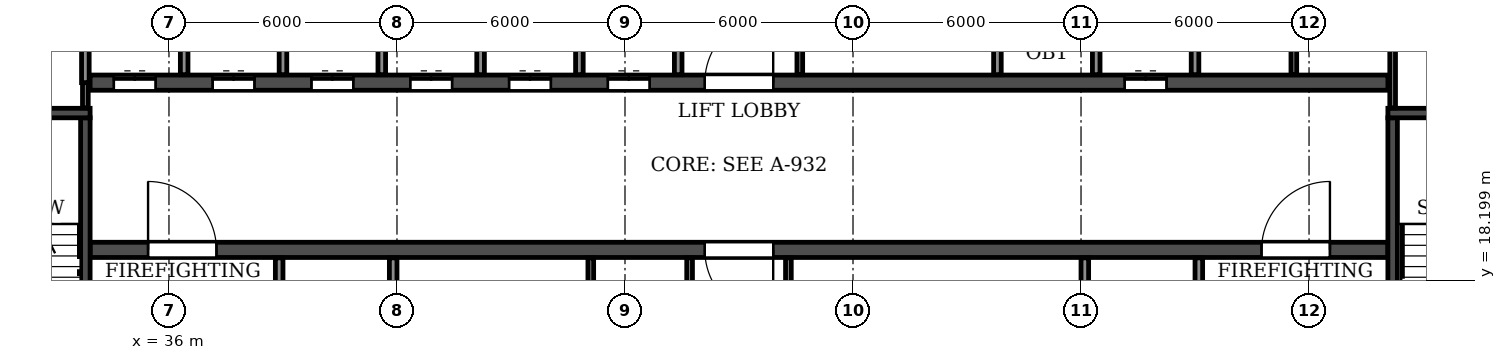
"""IFC4 building model, lengths in metres.
Left out: names, types, materials, properties, quantities, classifications, styles, units other than length and angle.
Written with IfcOpenShell. Run it as: python <this file> out.ifc"""

import sys

from ifc_helpers import new_model, si_unit, direction, frame, frame_2d, origin, place, context, subcontext, project, spatial, rectangle, extrude, element, fill, save


model = new_model("IFC4")
c1 = context("Model", 3, precision=1e-05, world=origin(), true_north=direction((0.0, 1.0)))
c2 = subcontext(c1, "Body", "Model", "MODEL_VIEW")
j1 = project(units=[si_unit("LENGTHUNIT", "METRE"), si_unit("PLANEANGLEUNIT", "RADIAN")], contexts=[c1])
p1 = place(None, origin())
s1 = spatial("IfcSite", under=j1, at=p1, CompositionType="ELEMENT")
p2 = place(p1, origin())
s2 = spatial("IfcBuilding", under=s1, at=p2, CompositionType="ELEMENT")
p3 = place(p2, frame((0.0, 0.0, 175.2)))
s3 = spatial("IfcBuildingStorey", under=s2, at=p3, CompositionType="ELEMENT", Elevation=175.2)
p4 = place(p3, frame((33.925, 19.0, 0.0), z_axis=(0.0, 0.0, 1.0), x_axis=(1.0, 0.0, 0.0)))
e1 = element("IfcWall", 1, at=p4, inside=s3, PredefinedType="SOLIDWALL", context=c2, shape_type="SweptSolid", body=[
    extrude(rectangle(XDim=34.15, YDim=0.4, at=frame_2d((17.075, 0.0))), origin(), (0.0, 0.0, 1.0), 3.08),
])
p5 = place(p4, frame((16.175, 0.0, 0.0)))
e2 = element("IfcOpeningElement", 2, at=p5, cuts=e1, PredefinedType="OPENING", context=c2, shape_type="SweptSolid", body=[
    extrude(rectangle(XDim=1.8, YDim=2.1, at=frame_2d((0.9, 1.05))), frame((0.0, 0.21, 0.0), z_axis=(0.0, -1.0, 0.0), x_axis=(1.0, 0.0, 0.0)), (0.0, 0.0, 1.0), 0.42),
])
p6 = place(p4, frame((1.525, 0.0, 0.0)))
e3 = element("IfcOpeningElement", 3, at=p6, cuts=e1, PredefinedType="OPENING", context=c2, shape_type="SweptSolid", body=[
    extrude(rectangle(XDim=1.8, YDim=2.1, at=frame_2d((0.9, 1.05))), frame((0.0, 0.21, 0.0), z_axis=(0.0, -1.0, 0.0), x_axis=(1.0, 0.0, 0.0)), (0.0, 0.0, 1.0), 0.42),
])
p7 = place(p4, frame((30.825, 0.0, 0.0)))
e4 = element("IfcOpeningElement", 4, at=p7, cuts=e1, PredefinedType="OPENING", context=c2, shape_type="SweptSolid", body=[
    extrude(rectangle(XDim=1.8, YDim=2.1, at=frame_2d((0.9, 1.05))), frame((0.0, 0.21, 0.0), z_axis=(0.0, -1.0, 0.0), x_axis=(1.0, 0.0, 0.0)), (0.0, 0.0, 1.0), 0.42),
])
p8 = place(p3, frame((33.925, 23.4, 0.0), z_axis=(0.0, 0.0, 1.0), x_axis=(1.0, 0.0, 0.0)))
e5 = element("IfcWall", 5, at=p8, inside=s3, PredefinedType="SOLIDWALL", context=c2, shape_type="SweptSolid", body=[
    extrude(rectangle(XDim=34.15, YDim=0.4, at=frame_2d((17.075, 0.0))), origin(), (0.0, 0.0, 1.0), 3.08),
])
p9 = place(p8, frame((16.175, 0.0, 0.0)))
e6 = element("IfcOpeningElement", 6, at=p9, cuts=e5, PredefinedType="OPENING", context=c2, shape_type="SweptSolid", body=[
    extrude(rectangle(XDim=1.8, YDim=2.1, at=frame_2d((0.9, 1.05))), frame((0.0, 0.21, 0.0), z_axis=(0.0, -1.0, 0.0), x_axis=(1.0, 0.0, 0.0)), (0.0, 0.0, 1.0), 0.42),
])
p10 = place(p8, frame((0.625, 0.0, 0.0)))
e7 = element("IfcOpeningElement", 7, at=p10, cuts=e5, PredefinedType="OPENING", context=c2, shape_type="SweptSolid", body=[
    extrude(rectangle(XDim=1.1, YDim=2.1, at=frame_2d((0.55, 1.05))), frame((0.0, 0.21, 0.0), z_axis=(0.0, -1.0, 0.0), x_axis=(1.0, 0.0, 0.0)), (0.0, 0.0, 1.0), 0.42),
])
p11 = place(p8, frame((3.225, 0.0, 0.0)))
e8 = element("IfcOpeningElement", 8, at=p11, cuts=e5, PredefinedType="OPENING", context=c2, shape_type="SweptSolid", body=[
    extrude(rectangle(XDim=1.1, YDim=2.1, at=frame_2d((0.55, 1.05))), frame((0.0, 0.21, 0.0), z_axis=(0.0, -1.0, 0.0), x_axis=(1.0, 0.0, 0.0)), (0.0, 0.0, 1.0), 0.42),
])
p12 = place(p8, frame((5.825, 0.0, 0.0)))
e9 = element("IfcOpeningElement", 9, at=p12, cuts=e5, PredefinedType="OPENING", context=c2, shape_type="SweptSolid", body=[
    extrude(rectangle(XDim=1.1, YDim=2.1, at=frame_2d((0.55, 1.05))), frame((0.0, 0.21, 0.0), z_axis=(0.0, -1.0, 0.0), x_axis=(1.0, 0.0, 0.0)), (0.0, 0.0, 1.0), 0.42),
])
p13 = place(p8, frame((8.425, 0.0, 0.0)))
e10 = element("IfcOpeningElement", 10, at=p13, cuts=e5, PredefinedType="OPENING", context=c2, shape_type="SweptSolid", body=[
    extrude(rectangle(XDim=1.1, YDim=2.1, at=frame_2d((0.55, 1.05))), frame((0.0, 0.21, 0.0), z_axis=(0.0, -1.0, 0.0), x_axis=(1.0, 0.0, 0.0)), (0.0, 0.0, 1.0), 0.42),
])
p14 = place(p8, frame((11.025, 0.0, 0.0)))
e11 = element("IfcOpeningElement", 11, at=p14, cuts=e5, PredefinedType="OPENING", context=c2, shape_type="SweptSolid", body=[
    extrude(rectangle(XDim=1.1, YDim=2.1, at=frame_2d((0.55, 1.05))), frame((0.0, 0.21, 0.0), z_axis=(0.0, -1.0, 0.0), x_axis=(1.0, 0.0, 0.0)), (0.0, 0.0, 1.0), 0.42),
])
p15 = place(p8, frame((13.625, 0.0, 0.0)))
e12 = element("IfcOpeningElement", 12, at=p15, cuts=e5, PredefinedType="OPENING", context=c2, shape_type="SweptSolid", body=[
    extrude(rectangle(XDim=1.1, YDim=2.1, at=frame_2d((0.55, 1.05))), frame((0.0, 0.21, 0.0), z_axis=(0.0, -1.0, 0.0), x_axis=(1.0, 0.0, 0.0)), (0.0, 0.0, 1.0), 0.42),
])
p16 = place(p8, frame((27.225, 0.0, 0.0)))
e13 = element("IfcOpeningElement", 13, at=p16, cuts=e5, PredefinedType="OPENING", context=c2, shape_type="SweptSolid", body=[
    extrude(rectangle(XDim=1.1, YDim=2.1, at=frame_2d((0.55, 1.05))), frame((0.0, 0.21, 0.0), z_axis=(0.0, -1.0, 0.0), x_axis=(1.0, 0.0, 0.0)), (0.0, 0.0, 1.0), 0.42),
])
p17 = place(p3, frame((33.8, 14.8, 0.0), z_axis=(0.0, 0.0, 1.0), x_axis=(0.0, 1.0, 0.0)))
e14 = element("IfcWall", 14, at=p17, inside=s3, PredefinedType="SOLIDWALL", context=c2, shape_type="SweptSolid", body=[
    extrude(rectangle(XDim=7.675, YDim=0.25, at=frame_2d((3.837, 0.0))), origin(), (0.0, 0.0, 1.0), 3.08),
])
p18 = place(p17, frame((0.5, 0.0, 0.0)))
e15 = element("IfcOpeningElement", 15, at=p18, cuts=e14, PredefinedType="OPENING", context=c2, shape_type="SweptSolid", body=[
    extrude(rectangle(XDim=1.0, YDim=2.1, at=frame_2d((0.5, 1.05))), frame((0.0, 0.135, 0.0), z_axis=(0.0, -1.0, 0.0), x_axis=(1.0, 0.0, 0.0)), (0.0, 0.0, 1.0), 0.27),
])
p19 = place(p3, frame((29.875, 22.6, 0.0), z_axis=(0.0, 0.0, 1.0), x_axis=(1.0, 0.0, 0.0)))
e16 = element("IfcWall", 16, at=p19, inside=s3, PredefinedType="SOLIDWALL", context=c2, shape_type="SweptSolid", body=[
    extrude(rectangle(XDim=4.05, YDim=0.25, at=frame_2d((2.025, 0.0))), origin(), (0.0, 0.0, 1.0), 3.08),
])
p20 = place(p3, frame((68.2, 14.8, 0.0), z_axis=(0.0, 0.0, 1.0), x_axis=(0.0, 1.0, 0.0)))
e17 = element("IfcWall", 17, at=p20, inside=s3, PredefinedType="SOLIDWALL", context=c2, shape_type="SweptSolid", body=[
    extrude(rectangle(XDim=7.675, YDim=0.25, at=frame_2d((3.837, 0.0))), origin(), (0.0, 0.0, 1.0), 3.08),
])
p21 = place(p20, frame((0.5, 0.0, 0.0)))
e18 = element("IfcOpeningElement", 18, at=p21, cuts=e17, PredefinedType="OPENING", context=c2, shape_type="SweptSolid", body=[
    extrude(rectangle(XDim=1.0, YDim=2.1, at=frame_2d((0.5, 1.05))), frame((0.0, 0.135, 0.0), z_axis=(0.0, -1.0, 0.0), x_axis=(1.0, 0.0, 0.0)), (0.0, 0.0, 1.0), 0.27),
])
p22 = place(p3, frame((68.075, 22.6, 0.0), z_axis=(0.0, 0.0, 1.0), x_axis=(1.0, 0.0, 0.0)))
e19 = element("IfcWall", 19, at=p22, inside=s3, PredefinedType="SOLIDWALL", context=c2, shape_type="SweptSolid", body=[
    extrude(rectangle(XDim=4.05, YDim=0.25, at=frame_2d((2.025, 0.0))), origin(), (0.0, 0.0, 1.0), 3.08),
])
for number, where, z_axis, x_axis in (
    (20, (49.7, 14.81, 0.0), (0.0, 0.0, 1.0), (0.0, 1.0, 0.0)),
    (21, (52.3, 14.81, 0.0), (0.0, 0.0, 1.0), (0.0, 1.0, 0.0)),
    (22, (52.6, 23.61, 0.0), (0.0, 0.0, 1.0), (0.0, 1.0, 0.0)),
    (23, (47.1, 14.81, 0.0), (0.0, 0.0, 1.0), (0.0, 1.0, 0.0)),
    (24, (65.6, 23.61, 0.0), (0.0, 0.0, 1.0), (0.0, 1.0, 0.0)),
):
    element("IfcWall", number, at=place(p3, frame(where, z_axis=z_axis, x_axis=x_axis)), inside=s3, PredefinedType="PARTITIONING", context=c2, shape_type="SweptSolid", body=[
        extrude(rectangle(XDim=3.98, YDim=0.15, at=frame_2d((1.99, 0.0))), origin(), (0.0, 0.0, 1.0), 3.08),
    ])
p23 = place(p3, frame((33.8, 22.735, 0.0), z_axis=(0.0, 0.0, 1.0), x_axis=(0.0, 1.0, 0.0)))
e25 = element("IfcWall", 25, at=p23, inside=s3, PredefinedType="PARTITIONING", context=c2, shape_type="SweptSolid", body=[
    extrude(rectangle(XDim=0.665, YDim=0.15, at=frame_2d((0.333, 0.0))), origin(), (0.0, 0.0, 1.0), 3.08),
])
p24 = place(p3, frame((68.2, 22.735, 0.0), z_axis=(0.0, 0.0, 1.0), x_axis=(0.0, 1.0, 0.0)))
e26 = element("IfcWall", 26, at=p24, inside=s3, PredefinedType="PARTITIONING", context=c2, shape_type="SweptSolid", body=[
    extrude(rectangle(XDim=4.855, YDim=0.15, at=frame_2d((2.427, 0.0))), origin(), (0.0, 0.0, 1.0), 3.08),
])
p25 = place(p3, frame((33.8, 23.4, 0.0), z_axis=(0.0, 0.0, 1.0), x_axis=(0.0, 1.0, 0.0)))
e27 = element("IfcWall", 27, at=p25, inside=s3, PredefinedType="PARTITIONING", context=c2, shape_type="SweptSolid", body=[
    extrude(rectangle(XDim=2.7, YDim=0.2, at=frame_2d((1.35, 0.0))), origin(), (0.0, 0.0, 1.0), 3.08),
])
p26 = place(p3, frame((36.4, 23.61, 0.0), z_axis=(0.0, 0.0, 1.0), x_axis=(0.0, 1.0, 0.0)))
e28 = element("IfcWall", 28, at=p26, inside=s3, PredefinedType="PARTITIONING", context=c2, shape_type="SweptSolid", body=[
    extrude(rectangle(XDim=2.49, YDim=0.2, at=frame_2d((1.245, 0.0))), origin(), (0.0, 0.0, 1.0), 3.08),
])
p27 = place(p3, frame((38.9, 14.81, 0.0), z_axis=(0.0, 0.0, 1.0), x_axis=(0.0, 1.0, 0.0)))
e29 = element("IfcWall", 29, at=p27, inside=s3, PredefinedType="PARTITIONING", context=c2, shape_type="SweptSolid", body=[
    extrude(rectangle(XDim=3.98, YDim=0.2, at=frame_2d((1.99, 0.0))), origin(), (0.0, 0.0, 1.0), 3.08),
])
p28 = place(p27, frame((1.44, 0.0, 0.0)))
e30 = element("IfcOpeningElement", 30, at=p28, cuts=e29, PredefinedType="OPENING", context=c2, shape_type="SweptSolid", body=[
    extrude(rectangle(XDim=1.1, YDim=2.1, at=frame_2d((0.55, 1.05))), frame((0.0, 0.11, 0.0), z_axis=(0.0, -1.0, 0.0), x_axis=(1.0, 0.0, 0.0)), (0.0, 0.0, 1.0), 0.22),
])
for number, where, z_axis, x_axis in (
    (31, (39.0, 23.61, 0.0), (0.0, 0.0, 1.0), (0.0, 1.0, 0.0)),
    (32, (41.6, 23.61, 0.0), (0.0, 0.0, 1.0), (0.0, 1.0, 0.0)),
):
    element("IfcWall", number, at=place(p3, frame(where, z_axis=z_axis, x_axis=x_axis)), inside=s3, PredefinedType="PARTITIONING", context=c2, shape_type="SweptSolid", body=[
        extrude(rectangle(XDim=2.49, YDim=0.2, at=frame_2d((1.245, 0.0))), origin(), (0.0, 0.0, 1.0), 3.08),
    ])
for number, where, z_axis, x_axis in (
    (33, (41.9, 14.81, 0.0), (0.0, 0.0, 1.0), (0.0, 1.0, 0.0)),
    (34, (44.2, 23.61, 0.0), (0.0, 0.0, 1.0), (0.0, 1.0, 0.0)),
    (35, (46.8, 23.61, 0.0), (0.0, 0.0, 1.0), (0.0, 1.0, 0.0)),
):
    element("IfcWall", number, at=place(p3, frame(where, z_axis=z_axis, x_axis=x_axis)), inside=s3, PredefinedType="PARTITIONING", context=c2, shape_type="SweptSolid", body=[
        extrude(rectangle(XDim=3.98, YDim=0.2, at=frame_2d((1.99, 0.0))), origin(), (0.0, 0.0, 1.0), 3.08),
    ])
for number, where, z_axis, x_axis in (
    (36, (49.4, 23.61, 0.0), (0.0, 0.0, 1.0), (0.0, 1.0, 0.0)),
    (37, (57.8, 23.61, 0.0), (0.0, 0.0, 1.0), (0.0, 1.0, 0.0)),
):
    element("IfcWall", number, at=place(p3, frame(where, z_axis=z_axis, x_axis=x_axis)), inside=s3, PredefinedType="PARTITIONING", context=c2, shape_type="SweptSolid", body=[
        extrude(rectangle(XDim=2.49, YDim=0.2, at=frame_2d((1.245, 0.0))), origin(), (0.0, 0.0, 1.0), 3.08),
    ])
p29 = place(p3, frame((60.1, 14.81, 0.0), z_axis=(0.0, 0.0, 1.0), x_axis=(0.0, 1.0, 0.0)))
e38 = element("IfcWall", 38, at=p29, inside=s3, PredefinedType="PARTITIONING", context=c2, shape_type="SweptSolid", body=[
    extrude(rectangle(XDim=3.98, YDim=0.2, at=frame_2d((1.99, 0.0))), origin(), (0.0, 0.0, 1.0), 3.08),
])
for number, where, z_axis, x_axis in (
    (39, (60.4, 23.61, 0.0), (0.0, 0.0, 1.0), (0.0, 1.0, 0.0)),
    (40, (63.0, 23.61, 0.0), (0.0, 0.0, 1.0), (0.0, 1.0, 0.0)),
):
    element("IfcWall", number, at=place(p3, frame(where, z_axis=z_axis, x_axis=x_axis)), inside=s3, PredefinedType="PARTITIONING", context=c2, shape_type="SweptSolid", body=[
        extrude(rectangle(XDim=2.49, YDim=0.2, at=frame_2d((1.245, 0.0))), origin(), (0.0, 0.0, 1.0), 3.08),
    ])
p30 = place(p3, frame((63.1, 14.81, 0.0), z_axis=(0.0, 0.0, 1.0), x_axis=(0.0, 1.0, 0.0)))
e41 = element("IfcWall", 41, at=p30, inside=s3, PredefinedType="PARTITIONING", context=c2, shape_type="SweptSolid", body=[
    extrude(rectangle(XDim=3.98, YDim=0.2, at=frame_2d((1.99, 0.0))), origin(), (0.0, 0.0, 1.0), 3.08),
])
p31 = place(p30, frame((1.44, 0.0, 0.0)))
e42 = element("IfcOpeningElement", 42, at=p31, cuts=e41, PredefinedType="OPENING", context=c2, shape_type="SweptSolid", body=[
    extrude(rectangle(XDim=1.1, YDim=2.1, at=frame_2d((0.55, 1.05))), frame((0.0, 0.11, 0.0), z_axis=(0.0, -1.0, 0.0), x_axis=(1.0, 0.0, 0.0)), (0.0, 0.0, 1.0), 0.22),
])
p32 = place(p9, origin())
e43 = element("IfcDoor", 43, at=p32, inside=s3, OperationType="DOUBLE_DOOR_SINGLE_SWING", PredefinedType="DOOR", context=c2, shape_type="SweptSolid", body=[
    extrude(rectangle(XDim=1.8, YDim=2.1, at=frame_2d((0.9, 1.05))), frame((0.0, 0.025, 0.0), z_axis=(0.0, -1.0, 0.0), x_axis=(1.0, 0.0, 0.0)), (0.0, 0.0, 1.0), 0.05),
])
fill(e6, e43)
p33 = place(p5, frame((1.8, 0.0, 0.0), z_axis=(0.0, 0.0, 1.0), x_axis=(-1.0, 0.0, 0.0)))
e44 = element("IfcDoor", 44, at=p33, inside=s3, OperationType="DOUBLE_DOOR_SINGLE_SWING", PredefinedType="DOOR", context=c2, shape_type="SweptSolid", body=[
    extrude(rectangle(XDim=1.8, YDim=2.1, at=frame_2d((0.9, 1.05))), frame((0.0, 0.025, 0.0), z_axis=(0.0, -1.0, 0.0), x_axis=(1.0, 0.0, 0.0)), (0.0, 0.0, 1.0), 0.05),
])
fill(e2, e44)
p34 = place(p10, origin())
e45 = element("IfcDoor", 45, at=p34, inside=s3, OperationType="DOUBLE_DOOR_SLIDING", PredefinedType="DOOR", context=c2, shape_type="SweptSolid", body=[
    extrude(rectangle(XDim=1.1, YDim=2.1, at=frame_2d((0.55, 1.05))), frame((0.0, 0.025, 0.0), z_axis=(0.0, -1.0, 0.0), x_axis=(1.0, 0.0, 0.0)), (0.0, 0.0, 1.0), 0.05),
])
fill(e7, e45)
p35 = place(p6, origin())
e46 = element("IfcDoor", 46, at=p35, inside=s3, OperationType="DOUBLE_DOOR_SINGLE_SWING", PredefinedType="DOOR", context=c2, shape_type="SweptSolid", body=[
    extrude(rectangle(XDim=1.8, YDim=2.1, at=frame_2d((0.9, 1.05))), frame((0.0, 0.025, 0.0), z_axis=(0.0, -1.0, 0.0), x_axis=(1.0, 0.0, 0.0)), (0.0, 0.0, 1.0), 0.05),
])
fill(e3, e46)
p36 = place(p11, origin())
e47 = element("IfcDoor", 47, at=p36, inside=s3, OperationType="DOUBLE_DOOR_SLIDING", PredefinedType="DOOR", context=c2, shape_type="SweptSolid", body=[
    extrude(rectangle(XDim=1.1, YDim=2.1, at=frame_2d((0.55, 1.05))), frame((0.0, 0.025, 0.0), z_axis=(0.0, -1.0, 0.0), x_axis=(1.0, 0.0, 0.0)), (0.0, 0.0, 1.0), 0.05),
])
fill(e8, e47)
p37 = place(p12, origin())
e48 = element("IfcDoor", 48, at=p37, inside=s3, OperationType="DOUBLE_DOOR_SLIDING", PredefinedType="DOOR", context=c2, shape_type="SweptSolid", body=[
    extrude(rectangle(XDim=1.1, YDim=2.1, at=frame_2d((0.55, 1.05))), frame((0.0, 0.025, 0.0), z_axis=(0.0, -1.0, 0.0), x_axis=(1.0, 0.0, 0.0)), (0.0, 0.0, 1.0), 0.05),
])
fill(e9, e48)
p38 = place(p13, origin())
e49 = element("IfcDoor", 49, at=p38, inside=s3, OperationType="DOUBLE_DOOR_SLIDING", PredefinedType="DOOR", context=c2, shape_type="SweptSolid", body=[
    extrude(rectangle(XDim=1.1, YDim=2.1, at=frame_2d((0.55, 1.05))), frame((0.0, 0.025, 0.0), z_axis=(0.0, -1.0, 0.0), x_axis=(1.0, 0.0, 0.0)), (0.0, 0.0, 1.0), 0.05),
])
fill(e10, e49)
p39 = place(p14, origin())
e50 = element("IfcDoor", 50, at=p39, inside=s3, OperationType="DOUBLE_DOOR_SLIDING", PredefinedType="DOOR", context=c2, shape_type="SweptSolid", body=[
    extrude(rectangle(XDim=1.1, YDim=2.1, at=frame_2d((0.55, 1.05))), frame((0.0, 0.025, 0.0), z_axis=(0.0, -1.0, 0.0), x_axis=(1.0, 0.0, 0.0)), (0.0, 0.0, 1.0), 0.05),
])
fill(e11, e50)
p40 = place(p15, origin())
e51 = element("IfcDoor", 51, at=p40, inside=s3, OperationType="DOUBLE_DOOR_SLIDING", PredefinedType="DOOR", context=c2, shape_type="SweptSolid", body=[
    extrude(rectangle(XDim=1.1, YDim=2.1, at=frame_2d((0.55, 1.05))), frame((0.0, 0.025, 0.0), z_axis=(0.0, -1.0, 0.0), x_axis=(1.0, 0.0, 0.0)), (0.0, 0.0, 1.0), 0.05),
])
fill(e12, e51)
p41 = place(p16, origin())
e52 = element("IfcDoor", 52, at=p41, inside=s3, OperationType="DOUBLE_DOOR_SLIDING", PredefinedType="DOOR", context=c2, shape_type="SweptSolid", body=[
    extrude(rectangle(XDim=1.1, YDim=2.1, at=frame_2d((0.55, 1.05))), frame((0.0, 0.025, 0.0), z_axis=(0.0, -1.0, 0.0), x_axis=(1.0, 0.0, 0.0)), (0.0, 0.0, 1.0), 0.05),
])
fill(e13, e52)
p42 = place(p7, origin())
e53 = element("IfcDoor", 53, at=p42, inside=s3, OperationType="DOUBLE_DOOR_SINGLE_SWING", PredefinedType="DOOR", context=c2, shape_type="SweptSolid", body=[
    extrude(rectangle(XDim=1.8, YDim=2.1, at=frame_2d((0.9, 1.05))), frame((0.0, 0.025, 0.0), z_axis=(0.0, -1.0, 0.0), x_axis=(1.0, 0.0, 0.0)), (0.0, 0.0, 1.0), 0.05),
])
fill(e4, e53)
save(model, sys.argv[1])
